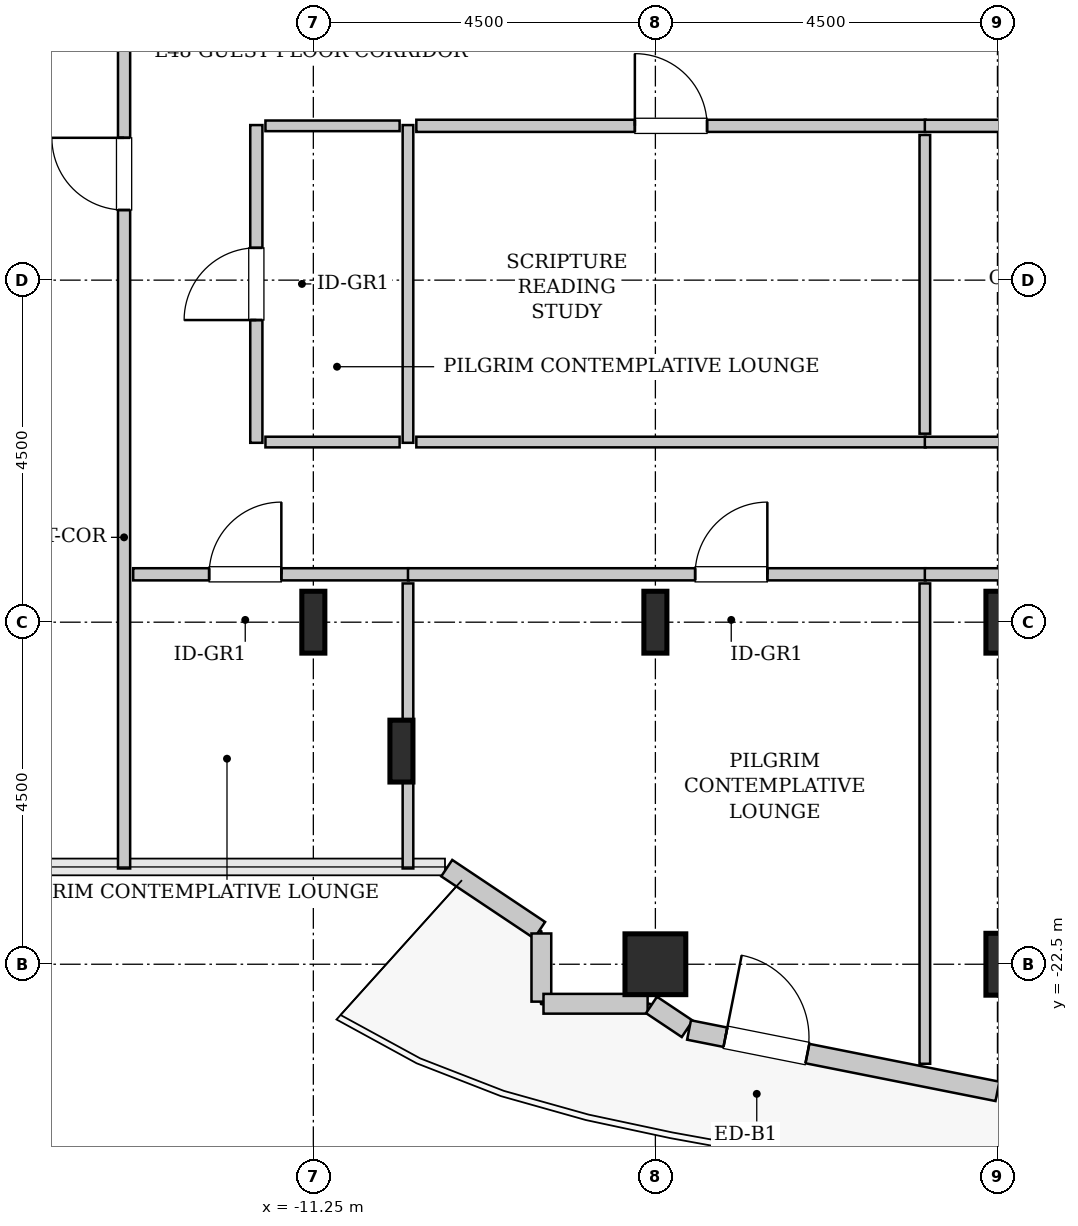
"""IFC4 building model, lengths in metres.
Left out: names, types, materials, properties, quantities, classifications, styles, units other than length and angle.
Written with IfcOpenShell. Run it as: python <this file> out.ifc"""

import sys

from ifc_helpers import new_model, si_unit, direction, frame, frame_2d, origin, origin_2d, place, context, subcontext, project, spatial, rectangle, hollow_rectangle, i_section, extrude, source, transform, mapped, element, fill, save


model = new_model("IFC4")
c1 = context("Model", 3, precision=1e-05, world=origin(), true_north=direction((0.0, 1.0)))
c2 = subcontext(c1, "Body", "Model", "MODEL_VIEW")
j1 = project(units=[si_unit("LENGTHUNIT", "METRE"), si_unit("PLANEANGLEUNIT", "RADIAN")], contexts=[c1])
p1 = place(None, origin())
s1 = spatial("IfcSite", under=j1, at=p1, CompositionType="ELEMENT")
p2 = place(p1, origin())
s2 = spatial("IfcBuilding", under=s1, at=p2, CompositionType="ELEMENT")
p3 = place(p2, frame((0.0, 0.0, 194.4)))
s3 = spatial("IfcBuildingStorey", under=s2, at=p3, CompositionType="ELEMENT", Elevation=194.4)
m1 = source(origin(), c2, "Body", "SweptSolid", [
    extrude(i_section(OverallWidth=0.303, OverallDepth=0.814, WebThickness=0.021, FlangeThickness=0.04, FilletRadius=0.03, at=origin_2d()), origin(), (0.0, 0.0, 1.0), 3.8),
])
for number, where, z_axis, x_axis in (
    (1, (-11.25, -18.0, 0.0), (0.0, 0.0, 1.0), (1.0, 0.0, 0.0)),
    (2, (-10.091, -19.696, 0.0), (0.0, 0.0, 1.0), (1.0, 0.0, 0.0)),
):
    element("IfcColumn", number, at=place(p3, frame(where, z_axis=z_axis, x_axis=x_axis)), inside=s3, PredefinedType="COLUMN", context=c2, shape_type="MappedRepresentation", body=[
        mapped(m1, transform((0.0, 0.0, 0.0), x_axis=(1.0, 0.0, 0.0), y_axis=(0.0, 1.0, 0.0), z_axis=(0.0, 0.0, 1.0), scale=1.0)),
    ])
m2 = source(origin(), c2, "Body", "SweptSolid", [
    extrude(hollow_rectangle(XDim=0.8, YDim=0.8, WallThickness=0.04, InnerFilletRadius=0.04, OuterFilletRadius=0.08, at=origin_2d()), origin(), (0.0, 0.0, 1.0), 3.8),
])
p4 = place(p3, frame((-6.75, -22.5, 0.0), z_axis=(0.0, 0.0, 1.0), x_axis=(1.0, 0.0, 0.0)))
e3 = element("IfcColumn", 3, at=p4, inside=s3, PredefinedType="COLUMN", context=c2, shape_type="MappedRepresentation", body=[
    mapped(m2, transform((0.0, 0.0, 0.0), x_axis=(1.0, 0.0, 0.0), y_axis=(0.0, 1.0, 0.0), z_axis=(0.0, 0.0, 1.0), scale=1.0)),
])
for number, where, z_axis, x_axis in (
    (4, (-6.75, -18.0, 0.0), (0.0, 0.0, 1.0), (1.0, 0.0, 0.0)),
    (5, (-2.25, -22.5, 0.0), (0.0, 0.0, 1.0), (1.0, 0.0, 0.0)),
    (6, (-2.25, -18.0, 0.0), (0.0, 0.0, 1.0), (1.0, 0.0, 0.0)),
):
    element("IfcColumn", number, at=place(p3, frame(where, z_axis=z_axis, x_axis=x_axis)), inside=s3, PredefinedType="COLUMN", context=c2, shape_type="MappedRepresentation", body=[
        mapped(m1, transform((0.0, 0.0, 0.0), x_axis=(1.0, 0.0, 0.0), y_axis=(0.0, 1.0, 0.0), z_axis=(0.0, 0.0, 1.0), scale=1.0)),
    ])
m3 = source(origin(), c2, "Body", "SweptSolid", [
    extrude(rectangle(XDim=1.469, YDim=0.26, at=frame_2d((0.734, 0.0))), origin(), (0.0, 0.0, 1.0), 3.55),
])
p5 = place(p3, frame((-9.495, -21.236, 0.0), z_axis=(0.0, 0.0, 1.0), x_axis=(0.831461760506, -0.555581983884, 0.0)))
e7 = element("IfcWall", 7, at=p5, inside=s3, PredefinedType="SOLIDWALL", context=c2, shape_type="MappedRepresentation", body=[
    mapped(m3, transform((0.0, 0.0, 0.0), x_axis=(1.0, 0.0, 0.0), y_axis=(0.0, 1.0, 0.0), z_axis=(0.0, 0.0, 1.0), scale=1.0)),
])
m4 = source(origin(), c2, "Body", "SweptSolid", [
    extrude(rectangle(XDim=0.897, YDim=0.26, at=frame_2d((0.448, 0.0))), origin(), (0.0, 0.0, 1.0), 3.55),
])
p6 = place(p3, frame((-8.25, -22.095, 0.0), z_axis=(0.0, 0.0, 1.0), x_axis=(0.0, -1.0, 0.0)))
e8 = element("IfcWall", 8, at=p6, inside=s3, PredefinedType="SOLIDWALL", context=c2, shape_type="MappedRepresentation", body=[
    mapped(m4, transform((0.0, 0.0, 0.0), x_axis=(1.0, 0.0, 0.0), y_axis=(0.0, 1.0, 0.0), z_axis=(0.0, 0.0, 1.0), scale=1.0)),
])
m5 = source(origin(), c2, "Body", "SweptSolid", [
    extrude(rectangle(XDim=1.37, YDim=0.26, at=frame_2d((0.685, 0.0))), origin(), (0.0, 0.0, 1.0), 3.55),
])
p7 = place(p3, frame((-8.222, -23.02, 0.0), z_axis=(0.0, 0.0, 1.0), x_axis=(1.0, 0.0, 0.0)))
e9 = element("IfcWall", 9, at=p7, inside=s3, PredefinedType="SOLIDWALL", context=c2, shape_type="MappedRepresentation", body=[
    mapped(m5, transform((0.0, 0.0, 0.0), x_axis=(1.0, 0.0, 0.0), y_axis=(0.0, 1.0, 0.0), z_axis=(0.0, 0.0, 1.0), scale=1.0)),
])
m6 = source(origin(), c2, "Body", "SweptSolid", [
    extrude(rectangle(XDim=0.565, YDim=0.26, at=frame_2d((0.283, 0.0))), origin(), (0.0, 0.0, 1.0), 3.55),
])
p8 = place(p3, frame((-6.801, -23.036, 0.0), z_axis=(0.0, 0.0, 1.0), x_axis=(0.831651492666, -0.555297933317, 0.0)))
e10 = element("IfcWall", 10, at=p8, inside=s3, PredefinedType="SOLIDWALL", context=c2, shape_type="MappedRepresentation", body=[
    mapped(m6, transform((0.0, 0.0, 0.0), x_axis=(1.0, 0.0, 0.0), y_axis=(0.0, 1.0, 0.0), z_axis=(0.0, 0.0, 1.0), scale=1.0)),
])
m7 = source(origin(), c2, "Body", "SweptSolid", [
    extrude(rectangle(XDim=4.137, YDim=0.26, at=frame_2d((2.068, 0.0))), origin(), (0.0, 0.0, 1.0), 3.55),
])
p9 = place(p3, frame((-6.307, -23.365, 0.0), z_axis=(0.0, 0.0, 1.0), x_axis=(0.980782170794, -0.195105954428, 0.0)))
e11 = element("IfcWall", 11, at=p9, inside=s3, PredefinedType="SOLIDWALL", context=c2, shape_type="MappedRepresentation", body=[
    mapped(m7, transform((0.0, 0.0, 0.0), x_axis=(1.0, 0.0, 0.0), y_axis=(0.0, 1.0, 0.0), z_axis=(0.0, 0.0, 1.0), scale=1.0)),
])
p10 = place(p9, frame((0.488, 0.0, 0.0)))
e12 = element("IfcOpeningElement", 12, at=p10, cuts=e11, PredefinedType="OPENING", context=c2, shape_type="SweptSolid", body=[
    extrude(rectangle(XDim=1.1, YDim=2.2, at=frame_2d((0.55, 1.1))), frame((0.0, 0.14, 0.0), z_axis=(0.0, -1.0, 0.0), x_axis=(1.0, 0.0, 0.0)), (0.0, 0.0, 1.0), 0.28),
])
m8 = source(origin(), c2, "Body", "SweptSolid", [
    extrude(rectangle(XDim=14.445, YDim=0.16, at=frame_2d((7.223, 0.0))), origin(), (0.0, 0.0, 1.0), 3.535),
])
p11 = place(p3, frame((-13.74, -21.24, 0.0), z_axis=(0.0, 0.0, 1.0), x_axis=(0.0, 1.0, 0.0)))
e13 = element("IfcWall", 13, at=p11, inside=s3, PredefinedType="PARTITIONING", context=c2, shape_type="MappedRepresentation", body=[
    mapped(m8, transform((0.0, 0.0, 0.0), x_axis=(1.0, 0.0, 0.0), y_axis=(0.0, 1.0, 0.0), z_axis=(0.0, 0.0, 1.0), scale=1.0)),
])
p12 = place(p11, frame((8.663, 0.0, 0.0)))
e14 = element("IfcOpeningElement", 14, at=p12, cuts=e13, PredefinedType="OPENING", context=c2, shape_type="SweptSolid", body=[
    extrude(rectangle(XDim=0.95, YDim=2.1, at=frame_2d((0.475, 1.05))), frame((0.0, 0.09, 0.0), z_axis=(0.0, -1.0, 0.0), x_axis=(1.0, 0.0, 0.0)), (0.0, 0.0, 1.0), 0.18),
])
m9 = source(origin(), c2, "Body", "SweptSolid", [
    extrude(rectangle(XDim=3.625, YDim=0.16, at=frame_2d((1.812, 0.0))), origin(), (0.0, 0.0, 1.0), 3.535),
])
p13 = place(p3, frame((-13.62, -17.37, 0.0), z_axis=(0.0, 0.0, 1.0), x_axis=(1.0, 0.0, 0.0)))
e15 = element("IfcWall", 15, at=p13, inside=s3, PredefinedType="PARTITIONING", context=c2, shape_type="MappedRepresentation", body=[
    mapped(m9, transform((0.0, 0.0, 0.0), x_axis=(1.0, 0.0, 0.0), y_axis=(0.0, 1.0, 0.0), z_axis=(0.0, 0.0, 1.0), scale=1.0)),
])
p14 = place(p13, frame((0.999, 0.0, 0.0)))
e16 = element("IfcOpeningElement", 16, at=p14, cuts=e15, PredefinedType="OPENING", context=c2, shape_type="SweptSolid", body=[
    extrude(rectangle(XDim=0.95, YDim=2.1, at=frame_2d((0.475, 1.05))), frame((0.0, 0.09, 0.0), z_axis=(0.0, -1.0, 0.0), x_axis=(1.0, 0.0, 0.0)), (0.0, 0.0, 1.0), 0.18),
])
m10 = source(origin(), c2, "Body", "SweptSolid", [
    extrude(rectangle(XDim=3.75, YDim=0.14, at=frame_2d((1.875, 0.0))), origin(), (0.0, 0.0, 1.0), 3.535),
])
p15 = place(p3, frame((-10.005, -21.24, 0.0), z_axis=(0.0, 0.0, 1.0), x_axis=(0.0, 1.0, 0.0)))
e17 = element("IfcWall", 17, at=p15, inside=s3, PredefinedType="PARTITIONING", context=c2, shape_type="MappedRepresentation", body=[
    mapped(m10, transform((0.0, 0.0, 0.0), x_axis=(1.0, 0.0, 0.0), y_axis=(0.0, 1.0, 0.0), z_axis=(0.0, 0.0, 1.0), scale=1.0)),
])
m11 = source(origin(), c2, "Body", "SweptSolid", [
    extrude(rectangle(XDim=4.18, YDim=0.16, at=frame_2d((2.09, 0.0))), origin(), (0.0, 0.0, 1.0), 3.535),
])
p16 = place(p3, frame((-12.0, -15.64, 0.0), z_axis=(0.0, 0.0, 1.0), x_axis=(0.0, 1.0, 0.0)))
e18 = element("IfcWall", 18, at=p16, inside=s3, PredefinedType="PARTITIONING", context=c2, shape_type="MappedRepresentation", body=[
    mapped(m11, transform((0.0, 0.0, 0.0), x_axis=(1.0, 0.0, 0.0), y_axis=(0.0, 1.0, 0.0), z_axis=(0.0, 0.0, 1.0), scale=1.0)),
])
p17 = place(p16, frame((1.615, 0.0, 0.0)))
e19 = element("IfcOpeningElement", 19, at=p17, cuts=e18, PredefinedType="OPENING", context=c2, shape_type="SweptSolid", body=[
    extrude(rectangle(XDim=0.95, YDim=2.1, at=frame_2d((0.475, 1.05))), frame((0.0, 0.09, 0.0), z_axis=(0.0, -1.0, 0.0), x_axis=(1.0, 0.0, 0.0)), (0.0, 0.0, 1.0), 0.18),
])
m12 = source(origin(), c2, "Body", "SweptSolid", [
    extrude(rectangle(XDim=4.18, YDim=0.14, at=frame_2d((2.09, 0.0))), origin(), (0.0, 0.0, 1.0), 3.535),
])
p18 = place(p3, frame((-10.005, -15.64, 0.0), z_axis=(0.0, 0.0, 1.0), x_axis=(0.0, 1.0, 0.0)))
e20 = element("IfcWall", 20, at=p18, inside=s3, PredefinedType="PARTITIONING", context=c2, shape_type="MappedRepresentation", body=[
    mapped(m12, transform((0.0, 0.0, 0.0), x_axis=(1.0, 0.0, 0.0), y_axis=(0.0, 1.0, 0.0), z_axis=(0.0, 0.0, 1.0), scale=1.0)),
])
m13 = source(origin(), c2, "Body", "SweptSolid", [
    extrude(rectangle(XDim=1.765, YDim=0.14, at=frame_2d((0.882, 0.0))), origin(), (0.0, 0.0, 1.0), 3.535),
])
for number, where, z_axis, x_axis in (
    (21, (-11.88, -11.47, 0.0), (0.0, 0.0, 1.0), (1.0, 0.0, 0.0)),
    (22, (-11.88, -15.63, 0.0), (0.0, 0.0, 1.0), (1.0, 0.0, 0.0)),
):
    element("IfcWall", number, at=place(p3, frame(where, z_axis=z_axis, x_axis=x_axis)), inside=s3, PredefinedType="PARTITIONING", context=c2, shape_type="MappedRepresentation", body=[
        mapped(m13, transform((0.0, 0.0, 0.0), x_axis=(1.0, 0.0, 0.0), y_axis=(0.0, 1.0, 0.0), z_axis=(0.0, 0.0, 1.0), scale=1.0)),
    ])
m14 = source(origin(), c2, "Body", "SweptSolid", [
    extrude(rectangle(XDim=6.81, YDim=0.16, at=frame_2d((3.405, 0.0))), origin(), (0.0, 0.0, 1.0), 3.535),
])
p19 = place(p3, frame((-10.005, -17.37, 0.0), z_axis=(0.0, 0.0, 1.0), x_axis=(1.0, 0.0, 0.0)))
e23 = element("IfcWall", 23, at=p19, inside=s3, PredefinedType="PARTITIONING", context=c2, shape_type="MappedRepresentation", body=[
    mapped(m14, transform((0.0, 0.0, 0.0), x_axis=(1.0, 0.0, 0.0), y_axis=(0.0, 1.0, 0.0), z_axis=(0.0, 0.0, 1.0), scale=1.0)),
])
p20 = place(p19, frame((3.778, 0.0, 0.0)))
e24 = element("IfcOpeningElement", 24, at=p20, cuts=e23, PredefinedType="OPENING", context=c2, shape_type="SweptSolid", body=[
    extrude(rectangle(XDim=0.95, YDim=2.1, at=frame_2d((0.475, 1.05))), frame((0.0, 0.09, 0.0), z_axis=(0.0, -1.0, 0.0), x_axis=(1.0, 0.0, 0.0)), (0.0, 0.0, 1.0), 0.18),
])
m15 = source(origin(), c2, "Body", "SweptSolid", [
    extrude(rectangle(XDim=6.319, YDim=0.14, at=frame_2d((3.16, 0.0))), origin(), (0.0, 0.0, 1.0), 3.535),
])
p21 = place(p3, frame((-3.205, -23.809, 0.0), z_axis=(0.0, 0.0, 1.0), x_axis=(0.0, 1.0, 0.0)))
e25 = element("IfcWall", 25, at=p21, inside=s3, PredefinedType="PARTITIONING", context=c2, shape_type="MappedRepresentation", body=[
    mapped(m15, transform((0.0, 0.0, 0.0), x_axis=(1.0, 0.0, 0.0), y_axis=(0.0, 1.0, 0.0), z_axis=(0.0, 0.0, 1.0), scale=1.0)),
])
m16 = source(origin(), c2, "Body", "SweptSolid", [
    extrude(rectangle(XDim=6.7, YDim=0.16, at=frame_2d((3.35, 0.0))), origin(), (0.0, 0.0, 1.0), 3.535),
])
p22 = place(p3, frame((-9.895, -11.47, 0.0), z_axis=(0.0, 0.0, 1.0), x_axis=(1.0, 0.0, 0.0)))
e26 = element("IfcWall", 26, at=p22, inside=s3, PredefinedType="PARTITIONING", context=c2, shape_type="MappedRepresentation", body=[
    mapped(m16, transform((0.0, 0.0, 0.0), x_axis=(1.0, 0.0, 0.0), y_axis=(0.0, 1.0, 0.0), z_axis=(0.0, 0.0, 1.0), scale=1.0)),
])
p23 = place(p22, frame((2.875, 0.0, 0.0)))
e27 = element("IfcOpeningElement", 27, at=p23, cuts=e26, PredefinedType="OPENING", context=c2, shape_type="SweptSolid", body=[
    extrude(rectangle(XDim=0.95, YDim=2.1, at=frame_2d((0.475, 1.05))), frame((0.0, 0.09, 0.0), z_axis=(0.0, -1.0, 0.0), x_axis=(1.0, 0.0, 0.0)), (0.0, 0.0, 1.0), 0.18),
])
m17 = source(origin(), c2, "Body", "SweptSolid", [
    extrude(rectangle(XDim=6.7, YDim=0.14, at=frame_2d((3.35, 0.0))), origin(), (0.0, 0.0, 1.0), 3.535),
])
p24 = place(p3, frame((-9.895, -15.63, 0.0), z_axis=(0.0, 0.0, 1.0), x_axis=(1.0, 0.0, 0.0)))
e28 = element("IfcWall", 28, at=p24, inside=s3, PredefinedType="PARTITIONING", context=c2, shape_type="MappedRepresentation", body=[
    mapped(m17, transform((0.0, 0.0, 0.0), x_axis=(1.0, 0.0, 0.0), y_axis=(0.0, 1.0, 0.0), z_axis=(0.0, 0.0, 1.0), scale=1.0)),
])
m18 = source(origin(), c2, "Body", "SweptSolid", [
    extrude(rectangle(XDim=3.93, YDim=0.14, at=frame_2d((1.965, 0.0))), origin(), (0.0, 0.0, 1.0), 3.535),
])
p25 = place(p3, frame((-3.205, -15.52, 0.0), z_axis=(0.0, 0.0, 1.0), x_axis=(0.0, 1.0, 0.0)))
e29 = element("IfcWall", 29, at=p25, inside=s3, PredefinedType="PARTITIONING", context=c2, shape_type="MappedRepresentation", body=[
    mapped(m18, transform((0.0, 0.0, 0.0), x_axis=(1.0, 0.0, 0.0), y_axis=(0.0, 1.0, 0.0), z_axis=(0.0, 0.0, 1.0), scale=1.0)),
])
m19 = source(origin(), c2, "Body", "SweptSolid", [
    extrude(rectangle(XDim=7.81, YDim=0.16, at=frame_2d((3.905, 0.0))), origin(), (0.0, 0.0, 1.0), 3.535),
])
p26 = place(p3, frame((-3.205, -17.37, 0.0), z_axis=(0.0, 0.0, 1.0), x_axis=(1.0, 0.0, 0.0)))
e30 = element("IfcWall", 30, at=p26, inside=s3, PredefinedType="PARTITIONING", context=c2, shape_type="MappedRepresentation", body=[
    mapped(m19, transform((0.0, 0.0, 0.0), x_axis=(1.0, 0.0, 0.0), y_axis=(0.0, 1.0, 0.0), z_axis=(0.0, 0.0, 1.0), scale=1.0)),
])
p27 = place(p26, frame((3.43, 0.0, 0.0)))
e31 = element("IfcOpeningElement", 31, at=p27, cuts=e30, PredefinedType="OPENING", context=c2, shape_type="SweptSolid", body=[
    extrude(rectangle(XDim=0.95, YDim=2.1, at=frame_2d((0.475, 1.05))), frame((0.0, 0.09, 0.0), z_axis=(0.0, -1.0, 0.0), x_axis=(1.0, 0.0, 0.0)), (0.0, 0.0, 1.0), 0.18),
])
p28 = place(p3, frame((-3.205, -11.47, 0.0), z_axis=(0.0, 0.0, 1.0), x_axis=(1.0, 0.0, 0.0)))
e32 = element("IfcWall", 32, at=p28, inside=s3, PredefinedType="PARTITIONING", context=c2, shape_type="MappedRepresentation", body=[
    mapped(m19, transform((0.0, 0.0, 0.0), x_axis=(1.0, 0.0, 0.0), y_axis=(0.0, 1.0, 0.0), z_axis=(0.0, 0.0, 1.0), scale=1.0)),
])
p29 = place(p28, frame((3.43, 0.0, 0.0)))
e33 = element("IfcOpeningElement", 33, at=p29, cuts=e32, PredefinedType="OPENING", context=c2, shape_type="SweptSolid", body=[
    extrude(rectangle(XDim=0.95, YDim=2.1, at=frame_2d((0.475, 1.05))), frame((0.0, 0.09, 0.0), z_axis=(0.0, -1.0, 0.0), x_axis=(1.0, 0.0, 0.0)), (0.0, 0.0, 1.0), 0.18),
])
m20 = source(origin(), c2, "Body", "SweptSolid", [
    extrude(rectangle(XDim=7.81, YDim=0.14, at=frame_2d((3.905, 0.0))), origin(), (0.0, 0.0, 1.0), 3.535),
])
p30 = place(p3, frame((-3.205, -15.63, 0.0), z_axis=(0.0, 0.0, 1.0), x_axis=(1.0, 0.0, 0.0)))
e34 = element("IfcWall", 34, at=p30, inside=s3, PredefinedType="PARTITIONING", context=c2, shape_type="MappedRepresentation", body=[
    mapped(m20, transform((0.0, 0.0, 0.0), x_axis=(1.0, 0.0, 0.0), y_axis=(0.0, 1.0, 0.0), z_axis=(0.0, 0.0, 1.0), scale=1.0)),
])
m21 = source(origin(), c2, "Body", "SweptSolid", [
    extrude(rectangle(XDim=1.1, YDim=2.2, at=frame_2d((0.55, 1.1))), frame((0.0, 0.025, 0.0), z_axis=(0.0, -1.0, 0.0), x_axis=(1.0, 0.0, 0.0)), (0.0, 0.0, 1.0), 0.05),
])
p31 = place(p10, origin())
e35 = element("IfcDoor", 35, at=p31, inside=s3, OperationType="SINGLE_SWING_LEFT", PredefinedType="DOOR", context=c2, shape_type="MappedRepresentation", body=[
    mapped(m21, transform((0.0, 0.0, 0.0), x_axis=(1.0, 0.0, 0.0), y_axis=(0.0, 1.0, 0.0), z_axis=(0.0, 0.0, 1.0), scale=1.0)),
])
fill(e12, e35)
m22 = source(origin(), c2, "Body", "SweptSolid", [
    extrude(rectangle(XDim=0.95, YDim=2.1, at=frame_2d((0.475, 1.05))), frame((0.0, 0.025, 0.0), z_axis=(0.0, -1.0, 0.0), x_axis=(1.0, 0.0, 0.0)), (0.0, 0.0, 1.0), 0.05),
])
p32 = place(p12, origin())
e36 = element("IfcDoor", 36, at=p32, inside=s3, OperationType="SINGLE_SWING_RIGHT", PredefinedType="DOOR", context=c2, shape_type="MappedRepresentation", body=[
    mapped(m22, transform((0.0, 0.0, 0.0), x_axis=(1.0, 0.0, 0.0), y_axis=(0.0, 1.0, 0.0), z_axis=(0.0, 0.0, 1.0), scale=1.0)),
])
fill(e14, e36)
p33 = place(p14, origin())
e37 = element("IfcDoor", 37, at=p33, inside=s3, OperationType="SINGLE_SWING_RIGHT", PredefinedType="DOOR", context=c2, shape_type="MappedRepresentation", body=[
    mapped(m22, transform((0.0, 0.0, 0.0), x_axis=(1.0, 0.0, 0.0), y_axis=(0.0, 1.0, 0.0), z_axis=(0.0, 0.0, 1.0), scale=1.0)),
])
fill(e16, e37)
p34 = place(p17, origin())
e38 = element("IfcDoor", 38, at=p34, inside=s3, OperationType="SINGLE_SWING_LEFT", PredefinedType="DOOR", context=c2, shape_type="MappedRepresentation", body=[
    mapped(m22, transform((0.0, 0.0, 0.0), x_axis=(1.0, 0.0, 0.0), y_axis=(0.0, 1.0, 0.0), z_axis=(0.0, 0.0, 1.0), scale=1.0)),
])
fill(e19, e38)
p35 = place(p20, origin())
e39 = element("IfcDoor", 39, at=p35, inside=s3, OperationType="SINGLE_SWING_RIGHT", PredefinedType="DOOR", context=c2, shape_type="MappedRepresentation", body=[
    mapped(m22, transform((0.0, 0.0, 0.0), x_axis=(1.0, 0.0, 0.0), y_axis=(0.0, 1.0, 0.0), z_axis=(0.0, 0.0, 1.0), scale=1.0)),
])
fill(e24, e39)
p36 = place(p23, origin())
e40 = element("IfcDoor", 40, at=p36, inside=s3, OperationType="SINGLE_SWING_LEFT", PredefinedType="DOOR", context=c2, shape_type="MappedRepresentation", body=[
    mapped(m22, transform((0.0, 0.0, 0.0), x_axis=(1.0, 0.0, 0.0), y_axis=(0.0, 1.0, 0.0), z_axis=(0.0, 0.0, 1.0), scale=1.0)),
])
fill(e27, e40)
save(model, sys.argv[1])
